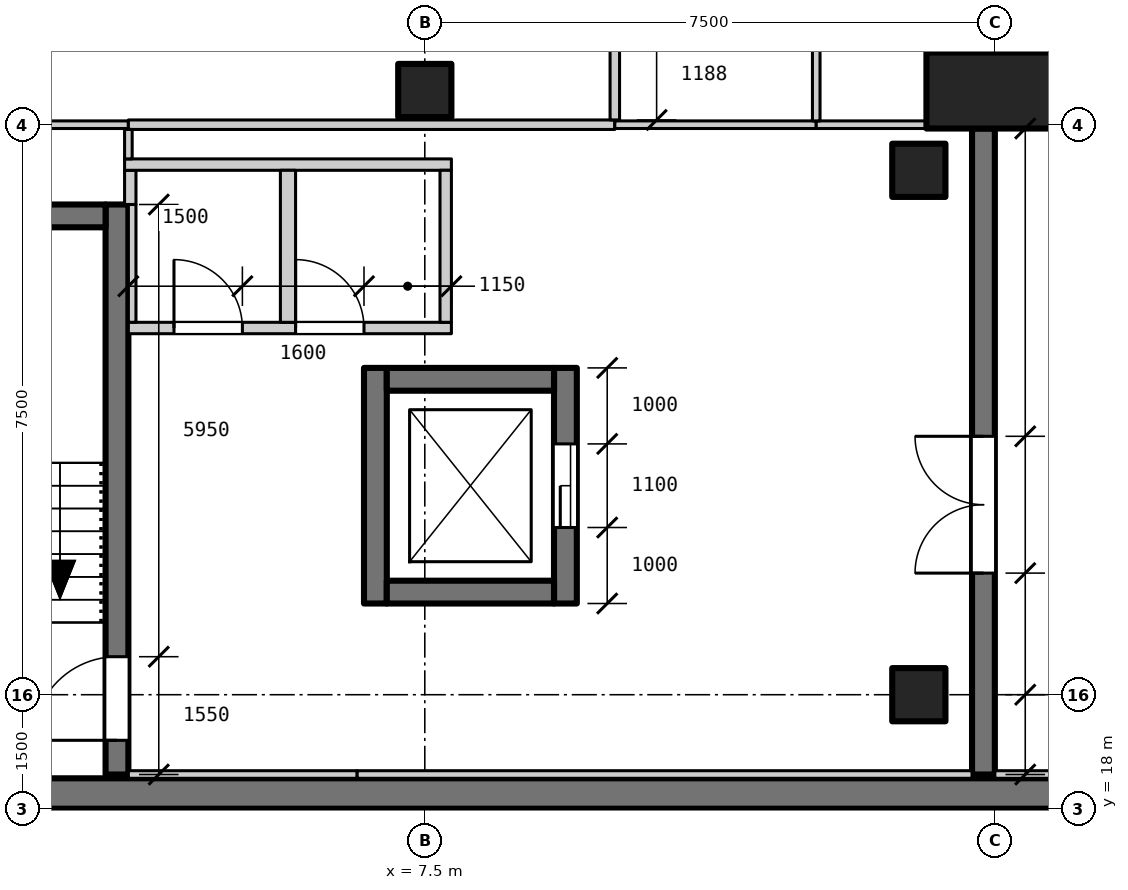
"""IFC4 building model, lengths in metres.
Left out: names, types, materials, properties, quantities, classifications, styles, units other than length and angle.
Written with IfcOpenShell. Run it as: python <this file> out.ifc"""

import sys

from ifc_helpers import new_model, si_unit, direction, frame, frame_2d, origin, origin_2d, place, context, subcontext, project, spatial, rectangle, extrude, element, fill, save


model = new_model("IFC4")
c1 = context("Model", 3, precision=1e-05, world=origin(), true_north=direction((0.0, 1.0)))
c2 = subcontext(c1, "Body", "Model", "MODEL_VIEW")
j1 = project(units=[si_unit("LENGTHUNIT", "METRE"), si_unit("PLANEANGLEUNIT", "RADIAN")], contexts=[c1])
p1 = place(None, origin())
s1 = spatial("IfcSite", under=j1, at=p1, CompositionType="ELEMENT")
p2 = place(p1, origin())
s2 = spatial("IfcBuilding", under=s1, at=p2, CompositionType="ELEMENT")
p3 = place(p2, frame((0.0, 0.0, -10.0)))
s3 = spatial("IfcBuildingStorey", under=s2, at=p3, CompositionType="ELEMENT", Elevation=-10.0)
for number, where, z_axis, x_axis in (
    (1, (7.5, 27.45, -1.4), (0.0, 0.0, 1.0), (1.0, 0.0, 0.0)),
    (2, (14.0, 19.5, -1.4), (0.0, 0.0, 1.0), (1.0, 0.0, 0.0)),
    (3, (14.0, 26.4, -1.4), (0.0, 0.0, 1.0), (1.0, 0.0, 0.0)),
):
    element("IfcColumn", number, at=place(p3, frame(where, z_axis=z_axis, x_axis=x_axis)), inside=s3, PredefinedType="COLUMN", context=c2, shape_type="SweptSolid", body=[
        extrude(rectangle(XDim=0.7, YDim=0.7, at=origin_2d()), origin(), (0.0, 0.0, 1.0), 6.4),
    ])
p4 = place(p3, frame((0.4, 18.2, -1.4), z_axis=(0.0, 0.0, 1.0), x_axis=(1.0, 0.0, 0.0)))
e4 = element("IfcWall", 4, at=p4, inside=s3, PredefinedType="SOLIDWALL", context=c2, shape_type="SweptSolid", body=[
    extrude(rectangle(XDim=57.2, YDim=0.4, at=frame_2d((28.6, 0.0))), origin(), (0.0, 0.0, 1.0), 6.4),
])
p5 = place(p3, frame((14.85, 18.45, -1.4), z_axis=(0.0, 0.0, 1.0), x_axis=(0.0, 1.0, 0.0)))
e5 = element("IfcWall", 5, at=p5, inside=s3, PredefinedType="SOLIDWALL", context=c2, shape_type="SweptSolid", body=[
    extrude(rectangle(XDim=8.5, YDim=0.3, at=frame_2d((4.25, 0.0))), origin(), (0.0, 0.0, 1.0), 6.4),
])
p6 = place(p5, frame((2.65, 0.0, 1.4)))
e6 = element("IfcOpeningElement", 6, at=p6, cuts=e5, PredefinedType="OPENING", context=c2, shape_type="SweptSolid", body=[
    extrude(rectangle(XDim=1.8, YDim=2.1, at=frame_2d((0.9, 1.05))), frame((0.0, 0.16, 0.0), z_axis=(0.0, -1.0, 0.0), x_axis=(1.0, 0.0, 0.0)), (0.0, 0.0, 1.0), 0.32),
])
p7 = place(p3, frame((3.45, 18.45, 0.0), z_axis=(0.0, 0.0, 1.0), x_axis=(0.0, 1.0, 0.0)))
e7 = element("IfcWall", 7, at=p7, inside=s3, PredefinedType="SHEAR", context=c2, shape_type="SweptSolid", body=[
    extrude(rectangle(XDim=7.5, YDim=0.3, at=frame_2d((3.75, 0.0))), origin(), (0.0, 0.0, 1.0), 5.0),
])
p8 = place(p7, frame((0.45, 0.0, 0.0)))
e8 = element("IfcOpeningElement", 8, at=p8, cuts=e7, PredefinedType="OPENING", context=c2, shape_type="SweptSolid", body=[
    extrude(rectangle(XDim=1.1, YDim=2.1, at=frame_2d((0.55, 1.05))), frame((0.0, 0.16, 0.0), z_axis=(0.0, -1.0, 0.0), x_axis=(1.0, 0.0, 0.0)), (0.0, 0.0, 1.0), 0.32),
])
p9 = place(p3, frame((0.3, 25.8, 0.0), z_axis=(0.0, 0.0, 1.0), x_axis=(1.0, 0.0, 0.0)))
e9 = element("IfcWall", 9, at=p9, inside=s3, PredefinedType="SHEAR", context=c2, shape_type="SweptSolid", body=[
    extrude(rectangle(XDim=3.0, YDim=0.3, at=frame_2d((1.5, 0.0))), origin(), (0.0, 0.0, 1.0), 5.0),
])
p10 = place(p3, frame((6.85, 20.7, -1.4), z_axis=(0.0, 0.0, 1.0), x_axis=(0.0, 1.0, 0.0)))
e10 = element("IfcWall", 10, at=p10, inside=s3, PredefinedType="SHEAR", context=c2, shape_type="SweptSolid", body=[
    extrude(rectangle(XDim=3.1, YDim=0.3, at=frame_2d((1.55, 0.0))), origin(), (0.0, 0.0, 1.0), 6.4),
])
p11 = place(p3, frame((9.35, 20.7, -1.4), z_axis=(0.0, 0.0, 1.0), x_axis=(0.0, 1.0, 0.0)))
e11 = element("IfcWall", 11, at=p11, inside=s3, PredefinedType="SHEAR", context=c2, shape_type="SweptSolid", body=[
    extrude(rectangle(XDim=3.1, YDim=0.3, at=frame_2d((1.55, 0.0))), origin(), (0.0, 0.0, 1.0), 6.4),
])
p12 = place(p11, frame((1.0, 0.0, 1.4)))
e12 = element("IfcOpeningElement", 12, at=p12, cuts=e11, PredefinedType="OPENING", context=c2, shape_type="SweptSolid", body=[
    extrude(rectangle(XDim=1.1, YDim=2.1, at=frame_2d((0.55, 1.05))), frame((0.0, 0.16, 0.0), z_axis=(0.0, -1.0, 0.0), x_axis=(1.0, 0.0, 0.0)), (0.0, 0.0, 1.0), 0.32),
])
for number, where, z_axis, x_axis in (
    (13, (7.0, 20.85, -1.4), (0.0, 0.0, 1.0), (1.0, 0.0, 0.0)),
    (14, (7.0, 23.65, -1.4), (0.0, 0.0, 1.0), (1.0, 0.0, 0.0)),
):
    element("IfcWall", number, at=place(p3, frame(where, z_axis=z_axis, x_axis=x_axis)), inside=s3, PredefinedType="SHEAR", context=c2, shape_type="SweptSolid", body=[
        extrude(rectangle(XDim=2.2, YDim=0.3, at=frame_2d((1.1, 0.0))), origin(), (0.0, 0.0, 1.0), 6.4),
    ])
p13 = place(p3, frame((15.0, 27.45, -1.4), z_axis=(0.0, 0.0, 1.0), x_axis=(1.0, 0.0, 0.0)))
e15 = element("IfcColumn", 15, at=p13, inside=s3, PredefinedType="COLUMN", context=c2, shape_type="SweptSolid", body=[
    extrude(rectangle(XDim=1.8, YDim=1.0, at=origin_2d()), origin(), (0.0, 0.0, 1.0), 6.4),
])
p14 = place(p3, frame((3.625, 25.95, 0.0), z_axis=(0.0, 0.0, 1.0), x_axis=(0.0, 1.0, 0.0)))
e16 = element("IfcWall", 16, at=p14, inside=s3, PredefinedType="PARTITIONING", context=c2, shape_type="SweptSolid", body=[
    extrude(rectangle(XDim=0.45, YDim=0.15, at=frame_2d((0.225, 0.0))), origin(), (0.0, 0.0, 1.0), 4.75),
])
p15 = place(p3, frame((3.55, 26.475, 0.0), z_axis=(0.0, 0.0, 1.0), x_axis=(1.0, 0.0, 0.0)))
e17 = element("IfcWall", 17, at=p15, inside=s3, PredefinedType="PARTITIONING", context=c2, shape_type="SweptSolid", body=[
    extrude(rectangle(XDim=4.3, YDim=0.15, at=frame_2d((2.15, 0.0))), origin(), (0.0, 0.0, 1.0), 3.35),
])
p16 = place(p3, frame((3.6, 24.325, 0.0), z_axis=(0.0, 0.0, 1.0), x_axis=(1.0, 0.0, 0.0)))
e18 = element("IfcWall", 18, at=p16, inside=s3, PredefinedType="PARTITIONING", context=c2, shape_type="SweptSolid", body=[
    extrude(rectangle(XDim=4.25, YDim=0.15, at=frame_2d((2.125, 0.0))), origin(), (0.0, 0.0, 1.0), 4.75),
])
p17 = place(p16, frame((0.6, 0.0, 0.0)))
e19 = element("IfcOpeningElement", 19, at=p17, cuts=e18, PredefinedType="OPENING", context=c2, shape_type="SweptSolid", body=[
    extrude(rectangle(XDim=0.9, YDim=2.1, at=frame_2d((0.45, 1.05))), frame((0.0, 0.085, 0.0), z_axis=(0.0, -1.0, 0.0), x_axis=(1.0, 0.0, 0.0)), (0.0, 0.0, 1.0), 0.17),
])
p18 = place(p16, frame((2.2, 0.0, 0.0)))
e20 = element("IfcOpeningElement", 20, at=p18, cuts=e18, PredefinedType="OPENING", context=c2, shape_type="SweptSolid", body=[
    extrude(rectangle(XDim=0.9, YDim=2.1, at=frame_2d((0.45, 1.05))), frame((0.0, 0.085, 0.0), z_axis=(0.0, -1.0, 0.0), x_axis=(1.0, 0.0, 0.0)), (0.0, 0.0, 1.0), 0.17),
])
p19 = place(p3, frame((3.65, 24.4, 0.0), z_axis=(0.0, 0.0, 1.0), x_axis=(0.0, 1.0, 0.0)))
e21 = element("IfcWall", 21, at=p19, inside=s3, PredefinedType="PARTITIONING", context=c2, shape_type="SweptSolid", body=[
    extrude(rectangle(XDim=1.55, YDim=0.1, at=frame_2d((0.775, 0.0))), origin(), (0.0, 0.0, 1.0), 4.75),
])
p20 = place(p3, frame((5.7, 24.4, 0.0), z_axis=(0.0, 0.0, 1.0), x_axis=(0.0, 1.0, 0.0)))
e22 = element("IfcWall", 22, at=p20, inside=s3, PredefinedType="PARTITIONING", context=c2, shape_type="SweptSolid", body=[
    extrude(rectangle(XDim=2.0, YDim=0.2, at=frame_2d((1.0, 0.0))), origin(), (0.0, 0.0, 1.0), 4.75),
])
p21 = place(p3, frame((7.775, 24.4, 0.0), z_axis=(0.0, 0.0, 1.0), x_axis=(0.0, 1.0, 0.0)))
e23 = element("IfcWall", 23, at=p21, inside=s3, PredefinedType="PARTITIONING", context=c2, shape_type="SweptSolid", body=[
    extrude(rectangle(XDim=2.0, YDim=0.15, at=frame_2d((1.0, 0.0))), origin(), (0.0, 0.0, 1.0), 4.75),
])
p22 = place(p3, frame((3.6, 18.45, 0.0), z_axis=(0.0, 0.0, 1.0), x_axis=(1.0, 0.0, 0.0)))
e24 = element("IfcWall", 24, at=p22, inside=s3, PredefinedType="PARTITIONING", context=c2, shape_type="SweptSolid", body=[
    extrude(rectangle(XDim=3.01, YDim=0.1, at=frame_2d((1.505, 0.0))), origin(), (0.0, 0.0, 1.0), 4.75),
])
p23 = place(p3, frame((6.61, 18.45, 0.0), z_axis=(0.0, 0.0, 1.0), x_axis=(1.0, 0.0, 0.0)))
e25 = element("IfcWall", 25, at=p23, inside=s3, PredefinedType="PARTITIONING", context=c2, shape_type="SweptSolid", body=[
    extrude(rectangle(XDim=8.09, YDim=0.1, at=frame_2d((4.045, 0.0))), origin(), (0.0, 0.0, 1.0), 4.75),
])
p24 = place(p3, frame((15.0, 18.45, 0.0), z_axis=(0.0, 0.0, 1.0), x_axis=(1.0, 0.0, 0.0)))
e26 = element("IfcWall", 26, at=p24, inside=s3, PredefinedType="PARTITIONING", context=c2, shape_type="SweptSolid", body=[
    extrude(rectangle(XDim=28.0, YDim=0.1, at=frame_2d((14.0, 0.0))), origin(), (0.0, 0.0, 1.0), 4.75),
])
p25 = place(p3, frame((0.4, 27.0, 0.0), z_axis=(0.0, 0.0, 1.0), x_axis=(1.0, 0.0, 0.0)))
e27 = element("IfcWall", 27, at=p25, inside=s3, PredefinedType="PARTITIONING", context=c2, shape_type="SweptSolid", body=[
    extrude(rectangle(XDim=3.2, YDim=0.1, at=frame_2d((1.6, 0.0))), origin(), (0.0, 0.0, 1.0), 4.75),
])
p26 = place(p3, frame((3.6, 27.0, 0.0), z_axis=(0.0, 0.0, 1.0), x_axis=(1.0, 0.0, 0.0)))
e28 = element("IfcWall", 28, at=p26, inside=s3, PredefinedType="PARTITIONING", context=c2, shape_type="SweptSolid", body=[
    extrude(rectangle(XDim=6.4, YDim=0.125, at=frame_2d((3.2, 0.0))), origin(), (0.0, 0.0, 1.0), 4.75),
])
p27 = place(p3, frame((10.0, 27.0, 0.0), z_axis=(0.0, 0.0, 1.0), x_axis=(1.0, 0.0, 0.0)))
e29 = element("IfcWall", 29, at=p27, inside=s3, PredefinedType="PARTITIONING", context=c2, shape_type="SweptSolid", body=[
    extrude(rectangle(XDim=2.65, YDim=0.1, at=frame_2d((1.325, 0.0))), origin(), (0.0, 0.0, 1.0), 4.75),
])
p28 = place(p3, frame((12.65, 27.0, 0.0), z_axis=(0.0, 0.0, 1.0), x_axis=(1.0, 0.0, 0.0)))
e30 = element("IfcWall", 30, at=p28, inside=s3, PredefinedType="PARTITIONING", context=c2, shape_type="SweptSolid", body=[
    extrude(rectangle(XDim=1.45, YDim=0.1, at=frame_2d((0.725, 0.0))), origin(), (0.0, 0.0, 1.0), 4.75),
])
p29 = place(p3, frame((3.6, 26.55, 0.0), z_axis=(0.0, 0.0, 1.0), x_axis=(0.0, 1.0, 0.0)))
e31 = element("IfcWall", 31, at=p29, inside=s3, PredefinedType="PARTITIONING", context=c2, shape_type="SweptSolid", body=[
    extrude(rectangle(XDim=0.387, YDim=0.1, at=frame_2d((0.194, 0.0))), origin(), (0.0, 0.0, 1.0), 4.75),
])
p30 = place(p3, frame((10.0, 27.062, 0.0), z_axis=(0.0, 0.0, 1.0), x_axis=(0.0, 1.0, 0.0)))
e32 = element("IfcWall", 32, at=p30, inside=s3, PredefinedType="PARTITIONING", context=c2, shape_type="SweptSolid", body=[
    extrude(rectangle(XDim=7.938, YDim=0.125, at=frame_2d((3.969, 0.0))), origin(), (0.0, 0.0, 1.0), 4.75),
])
p31 = place(p30, frame((3.45, 0.0, 0.0)))
e33 = element("IfcOpeningElement", 33, at=p31, cuts=e32, PredefinedType="OPENING", context=c2, shape_type="SweptSolid", body=[
    extrude(rectangle(XDim=1.0, YDim=2.1, at=frame_2d((0.5, 1.05))), frame((0.0, 0.073, 0.0), z_axis=(0.0, -1.0, 0.0), x_axis=(1.0, 0.0, 0.0)), (0.0, 0.0, 1.0), 0.145),
])
p32 = place(p3, frame((12.65, 27.05, 0.0), z_axis=(0.0, 0.0, 1.0), x_axis=(0.0, 1.0, 0.0)))
e34 = element("IfcWall", 34, at=p32, inside=s3, PredefinedType="PARTITIONING", context=c2, shape_type="SweptSolid", body=[
    extrude(rectangle(XDim=1.95, YDim=0.1, at=frame_2d((0.975, 0.0))), origin(), (0.0, 0.0, 1.0), 4.75),
])
p33 = place(p3, frame((15.0, 27.95, 0.0), z_axis=(0.0, 0.0, 1.0), x_axis=(0.0, 1.0, 0.0)))
e35 = element("IfcWall", 35, at=p33, inside=s3, PredefinedType="PARTITIONING", context=c2, shape_type="SweptSolid", body=[
    extrude(rectangle(XDim=0.988, YDim=0.1, at=frame_2d((0.494, 0.0))), origin(), (0.0, 0.0, 1.0), 4.75),
])
p34 = place(p6, origin())
e36 = element("IfcDoor", 36, at=p34, inside=s3, OperationType="DOUBLE_DOOR_SINGLE_SWING", PredefinedType="DOOR", context=c2, shape_type="SweptSolid", body=[
    extrude(rectangle(XDim=1.8, YDim=2.1, at=frame_2d((0.9, 1.05))), frame((0.0, 0.025, 0.0), z_axis=(0.0, -1.0, 0.0), x_axis=(1.0, 0.0, 0.0)), (0.0, 0.0, 1.0), 0.05),
])
fill(e6, e36)
p35 = place(p17, origin())
e37 = element("IfcDoor", 37, at=p35, inside=s3, OperationType="SINGLE_SWING_LEFT", PredefinedType="DOOR", context=c2, shape_type="SweptSolid", body=[
    extrude(rectangle(XDim=0.9, YDim=2.1, at=frame_2d((0.45, 1.05))), frame((0.0, 0.025, 0.0), z_axis=(0.0, -1.0, 0.0), x_axis=(1.0, 0.0, 0.0)), (0.0, 0.0, 1.0), 0.05),
])
fill(e19, e37)
p36 = place(p18, origin())
e38 = element("IfcDoor", 38, at=p36, inside=s3, OperationType="SINGLE_SWING_LEFT", PredefinedType="DOOR", context=c2, shape_type="SweptSolid", body=[
    extrude(rectangle(XDim=0.9, YDim=2.1, at=frame_2d((0.45, 1.05))), frame((0.0, 0.025, 0.0), z_axis=(0.0, -1.0, 0.0), x_axis=(1.0, 0.0, 0.0)), (0.0, 0.0, 1.0), 0.05),
])
fill(e20, e38)
p37 = place(p8, origin())
e39 = element("IfcDoor", 39, at=p37, inside=s3, OperationType="SINGLE_SWING_LEFT", PredefinedType="DOOR", context=c2, shape_type="SweptSolid", body=[
    extrude(rectangle(XDim=1.1, YDim=2.1, at=frame_2d((0.55, 1.05))), frame((0.0, 0.025, 0.0), z_axis=(0.0, -1.0, 0.0), x_axis=(1.0, 0.0, 0.0)), (0.0, 0.0, 1.0), 0.05),
])
fill(e8, e39)
p38 = place(p12, origin())
e40 = element("IfcDoor", 40, at=p38, inside=s3, OperationType="SLIDING_TO_LEFT", PredefinedType="DOOR", context=c2, shape_type="SweptSolid", body=[
    extrude(rectangle(XDim=1.1, YDim=2.1, at=frame_2d((0.55, 1.05))), frame((0.0, 0.025, 0.0), z_axis=(0.0, -1.0, 0.0), x_axis=(1.0, 0.0, 0.0)), (0.0, 0.0, 1.0), 0.05),
])
fill(e12, e40)
save(model, sys.argv[1])
